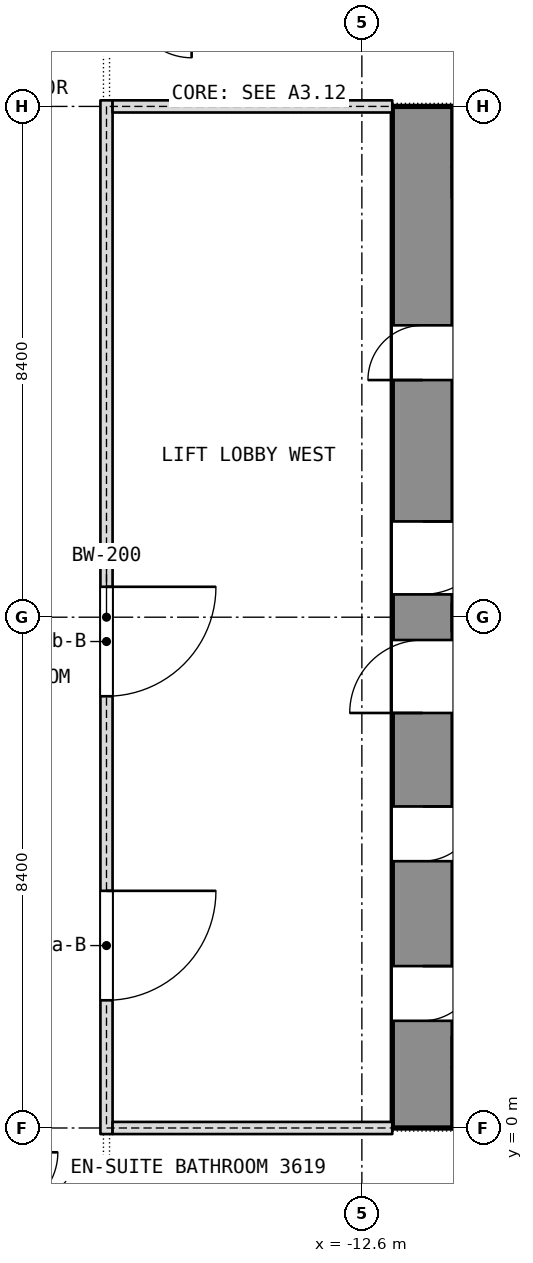
"""IFC4 building model, lengths in metres.
Left out: names, types, materials, properties, quantities, classifications, styles, units other than length and angle.
Written with IfcOpenShell. Run it as: python <this file> out.ifc"""

import sys

from ifc_helpers import new_model, si_unit, direction, frame, frame_2d, origin, place, context, subcontext, project, spatial, rectangle, extrude, element, fill, save


model = new_model("IFC4")
c1 = context("Model", 3, precision=1e-05, world=origin(), true_north=direction((0.0, 1.0)))
c2 = subcontext(c1, "Body", "Model", "MODEL_VIEW")
j1 = project(units=[si_unit("LENGTHUNIT", "METRE"), si_unit("PLANEANGLEUNIT", "RADIAN")], contexts=[c1])
p1 = place(None, origin())
s1 = spatial("IfcSite", under=j1, at=p1, CompositionType="ELEMENT")
p2 = place(p1, origin())
s2 = spatial("IfcBuilding", under=s1, at=p2, CompositionType="ELEMENT")
p3 = place(p2, frame((0.0, 0.0, 155.3)))
s3 = spatial("IfcBuildingStorey", under=s2, at=p3, CompositionType="ELEMENT", Elevation=155.3)
p4 = place(p3, frame((-11.6, 0.0, 0.0), z_axis=(0.0, 0.0, 1.0), x_axis=(0.0, 1.0, 0.0)))
e1 = element("IfcWall", 1, at=p4, inside=s3, PredefinedType="SHEAR", context=c2, shape_type="SweptSolid", body=[
    extrude(rectangle(XDim=16.8, YDim=1.0, at=frame_2d((8.4, 0.0))), origin(), (0.0, 0.0, 1.0), 3.6),
])
p5 = place(p4, frame((1.762, 0.0, 0.0)))
e2 = element("IfcOpeningElement", 2, at=p5, cuts=e1, PredefinedType="OPENING", context=c2, shape_type="SweptSolid", body=[
    extrude(rectangle(XDim=0.9, YDim=2.1, at=frame_2d((0.45, 1.05))), frame((0.0, 0.5, 0.0), z_axis=(0.0, -1.0, 0.0), x_axis=(1.0, 0.0, 0.0)), (0.0, 0.0, 1.0), 1.0),
])
p6 = place(p4, frame((4.387, 0.0, 0.0)))
e3 = element("IfcOpeningElement", 3, at=p6, cuts=e1, PredefinedType="OPENING", context=c2, shape_type="SweptSolid", body=[
    extrude(rectangle(XDim=0.9, YDim=2.1, at=frame_2d((0.45, 1.05))), frame((0.0, 0.5, 0.0), z_axis=(0.0, -1.0, 0.0), x_axis=(1.0, 0.0, 0.0)), (0.0, 0.0, 1.0), 1.0),
])
p7 = place(p4, frame((6.825, 0.0, 0.0)))
e4 = element("IfcOpeningElement", 4, at=p7, cuts=e1, PredefinedType="OPENING", context=c2, shape_type="SweptSolid", body=[
    extrude(rectangle(XDim=1.2, YDim=2.1, at=frame_2d((0.6, 1.05))), frame((0.0, 0.5, 0.0), z_axis=(0.0, -1.0, 0.0), x_axis=(1.0, 0.0, 0.0)), (0.0, 0.0, 1.0), 1.0),
])
p8 = place(p4, frame((12.3, 0.0, 0.0)))
e5 = element("IfcOpeningElement", 5, at=p8, cuts=e1, PredefinedType="OPENING", context=c2, shape_type="SweptSolid", body=[
    extrude(rectangle(XDim=0.9, YDim=2.1, at=frame_2d((0.45, 1.05))), frame((0.0, 0.5, 0.0), z_axis=(0.0, -1.0, 0.0), x_axis=(1.0, 0.0, 0.0)), (0.0, 0.0, 1.0), 1.0),
])
p9 = place(p4, frame((8.775, 0.0, 0.0)))
e6 = element("IfcOpeningElement", 6, at=p9, cuts=e1, PredefinedType="OPENING", context=c2, shape_type="SweptSolid", body=[
    extrude(rectangle(XDim=1.2, YDim=2.1, at=frame_2d((0.6, 1.05))), frame((0.0, 0.5, 0.0), z_axis=(0.0, -1.0, 0.0), x_axis=(1.0, 0.0, 0.0)), (0.0, 0.0, 1.0), 1.0),
])
p10 = place(p3, frame((-11.1, 8.4, 0.0), z_axis=(0.0, 0.0, 1.0), x_axis=(1.0, 0.0, 0.0)))
e7 = element("IfcWall", 7, at=p10, inside=s3, PredefinedType="SHEAR", context=c2, shape_type="SweptSolid", body=[
    extrude(rectangle(XDim=6.675, YDim=0.45, at=frame_2d((3.337, 0.0))), origin(), (0.0, 0.0, 1.0), 3.6),
])
p11 = place(p3, frame((-16.8, -0.1, 0.0), z_axis=(0.0, 0.0, 1.0), x_axis=(0.0, 1.0, 0.0)))
e8 = element("IfcWall", 8, at=p11, inside=s3, PredefinedType="PARTITIONING", context=c2, shape_type="SweptSolid", body=[
    extrude(rectangle(XDim=17.0, YDim=0.2, at=frame_2d((8.5, 0.0))), origin(), (0.0, 0.0, 1.0), 3.34),
])
p12 = place(p11, frame((2.2, 0.0, 0.0)))
e9 = element("IfcOpeningElement", 9, at=p12, cuts=e8, PredefinedType="OPENING", context=c2, shape_type="SweptSolid", body=[
    extrude(rectangle(XDim=1.8, YDim=2.1, at=frame_2d((0.9, 1.05))), frame((0.0, 0.1, 0.0), z_axis=(0.0, -1.0, 0.0), x_axis=(1.0, 0.0, 0.0)), (0.0, 0.0, 1.0), 0.2),
])
p13 = place(p11, frame((7.2, 0.0, 0.0)))
e10 = element("IfcOpeningElement", 10, at=p13, cuts=e8, PredefinedType="OPENING", context=c2, shape_type="SweptSolid", body=[
    extrude(rectangle(XDim=1.8, YDim=2.1, at=frame_2d((0.9, 1.05))), frame((0.0, 0.1, 0.0), z_axis=(0.0, -1.0, 0.0), x_axis=(1.0, 0.0, 0.0)), (0.0, 0.0, 1.0), 0.2),
])
for number, where, z_axis, x_axis in (
    (11, (-16.7, 0.0, 0.0), (0.0, 0.0, 1.0), (1.0, 0.0, 0.0)),
    (12, (-16.7, 16.8, 0.0), (0.0, 0.0, 1.0), (1.0, 0.0, 0.0)),
):
    element("IfcWall", number, at=place(p3, frame(where, z_axis=z_axis, x_axis=x_axis)), inside=s3, PredefinedType="PARTITIONING", context=c2, shape_type="SweptSolid", body=[
        extrude(rectangle(XDim=4.6, YDim=0.2, at=frame_2d((2.3, 0.0))), origin(), (0.0, 0.0, 1.0), 2.89),
    ])
p14 = place(p5, origin())
e13 = element("IfcDoor", 13, at=p14, inside=s3, OperationType="SINGLE_SWING_LEFT", PredefinedType="DOOR", context=c2, shape_type="SweptSolid", body=[
    extrude(rectangle(XDim=0.9, YDim=2.1, at=frame_2d((0.45, 1.05))), frame((0.0, 0.025, 0.0), z_axis=(0.0, -1.0, 0.0), x_axis=(1.0, 0.0, 0.0)), (0.0, 0.0, 1.0), 0.05),
])
fill(e2, e13)
p15 = place(p6, origin())
e14 = element("IfcDoor", 14, at=p15, inside=s3, OperationType="SINGLE_SWING_LEFT", PredefinedType="DOOR", context=c2, shape_type="SweptSolid", body=[
    extrude(rectangle(XDim=0.9, YDim=2.1, at=frame_2d((0.45, 1.05))), frame((0.0, 0.025, 0.0), z_axis=(0.0, -1.0, 0.0), x_axis=(1.0, 0.0, 0.0)), (0.0, 0.0, 1.0), 0.05),
])
fill(e3, e14)
p16 = place(p7, origin())
e15 = element("IfcDoor", 15, at=p16, inside=s3, OperationType="SINGLE_SWING_LEFT", PredefinedType="DOOR", context=c2, shape_type="SweptSolid", body=[
    extrude(rectangle(XDim=1.2, YDim=2.1, at=frame_2d((0.6, 1.05))), frame((0.0, 0.025, 0.0), z_axis=(0.0, -1.0, 0.0), x_axis=(1.0, 0.0, 0.0)), (0.0, 0.0, 1.0), 0.05),
])
fill(e4, e15)
p17 = place(p8, origin())
e16 = element("IfcDoor", 16, at=p17, inside=s3, OperationType="SINGLE_SWING_LEFT", PredefinedType="DOOR", context=c2, shape_type="SweptSolid", body=[
    extrude(rectangle(XDim=0.9, YDim=2.1, at=frame_2d((0.45, 1.05))), frame((0.0, 0.025, 0.0), z_axis=(0.0, -1.0, 0.0), x_axis=(1.0, 0.0, 0.0)), (0.0, 0.0, 1.0), 0.05),
])
fill(e5, e16)
p18 = place(p9, origin())
e17 = element("IfcDoor", 17, at=p18, inside=s3, OperationType="SINGLE_SWING_LEFT", PredefinedType="DOOR", context=c2, shape_type="SweptSolid", body=[
    extrude(rectangle(XDim=1.2, YDim=2.1, at=frame_2d((0.6, 1.05))), frame((0.0, 0.025, 0.0), z_axis=(0.0, -1.0, 0.0), x_axis=(1.0, 0.0, 0.0)), (0.0, 0.0, 1.0), 0.05),
])
fill(e6, e17)
p19 = place(p12, origin())
e18 = element("IfcDoor", 18, at=p19, inside=s3, OperationType="DOUBLE_DOOR_SINGLE_SWING", PredefinedType="DOOR", context=c2, shape_type="SweptSolid", body=[
    extrude(rectangle(XDim=1.8, YDim=2.1, at=frame_2d((0.9, 1.05))), frame((0.0, 0.025, 0.0), z_axis=(0.0, -1.0, 0.0), x_axis=(1.0, 0.0, 0.0)), (0.0, 0.0, 1.0), 0.05),
])
fill(e9, e18)
p20 = place(p13, origin())
e19 = element("IfcDoor", 19, at=p20, inside=s3, OperationType="DOUBLE_DOOR_SINGLE_SWING", PredefinedType="DOOR", context=c2, shape_type="SweptSolid", body=[
    extrude(rectangle(XDim=1.8, YDim=2.1, at=frame_2d((0.9, 1.05))), frame((0.0, 0.025, 0.0), z_axis=(0.0, -1.0, 0.0), x_axis=(1.0, 0.0, 0.0)), (0.0, 0.0, 1.0), 0.05),
])
fill(e10, e19)
save(model, sys.argv[1])
